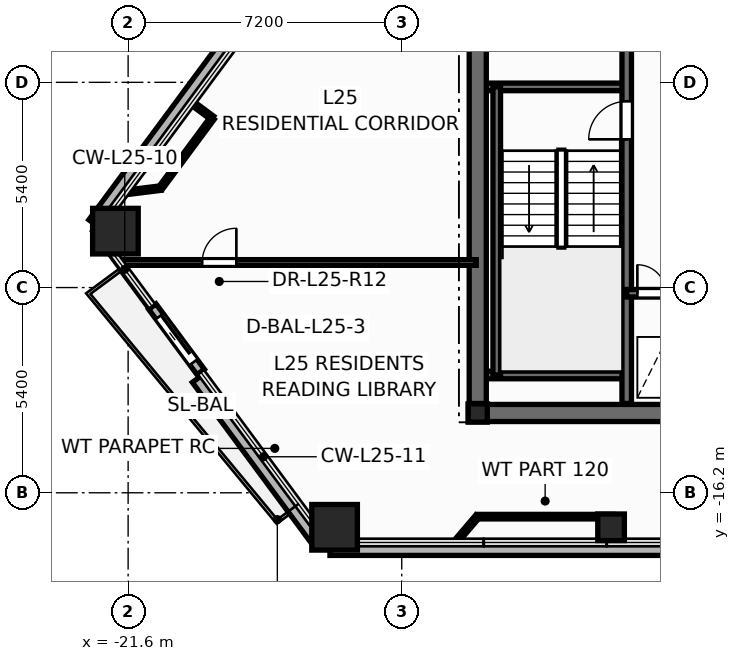
"""IFC4 building model, lengths in metres.
Left out: names, types, materials, properties, quantities, classifications, styles, units other than length and angle.
Written with IfcOpenShell. Run it as: python <this file> out.ifc"""

import sys

from ifc_helpers import new_model, si_unit, direction, frame, frame_2d, origin, origin_2d, place, context, subcontext, project, spatial, rectangle, hollow_rectangle, hollow_circle, i_section, extrude, element, fill, save


model = new_model("IFC4")
c1 = context("Model", 3, precision=1e-05, world=origin(), true_north=direction((0.0, 1.0)))
c2 = subcontext(c1, "Body", "Model", "MODEL_VIEW")
j1 = project(units=[si_unit("LENGTHUNIT", "METRE"), si_unit("PLANEANGLEUNIT", "RADIAN")], contexts=[c1])
p1 = place(None, origin())
s1 = spatial("IfcSite", under=j1, at=p1, CompositionType="ELEMENT")
p2 = place(p1, origin())
s2 = spatial("IfcBuilding", under=s1, at=p2, CompositionType="ELEMENT")
p3 = place(p2, frame((0.0, 0.0, 99.6)))
s3 = spatial("IfcBuildingStorey", under=s2, at=p3, CompositionType="ELEMENT", Elevation=99.6)
for number, where, z_axis, x_axis in (
    (1, (-21.934, -9.316, 0.0), (0.0, 0.0, 1.0), (1.0, 0.0, 0.0)),
    (2, (-16.167, -17.108, 0.0), (0.0, 0.0, 1.0), (1.0, 0.0, 0.0)),
):
    element("IfcColumn", number, at=place(p3, frame(where, z_axis=z_axis, x_axis=x_axis)), inside=s3, PredefinedType="COLUMN", context=c2, shape_type="SweptSolid", body=[
        extrude(hollow_rectangle(XDim=1.2, YDim=1.2, WallThickness=0.055, at=origin_2d()), origin(), (0.0, 0.0, 1.0), 3.6),
    ])
p4 = place(p3, frame((-8.892, -17.108, 0.0), z_axis=(0.0, 0.0, 1.0), x_axis=(1.0, 0.0, 0.0)))
e3 = element("IfcColumn", 3, at=p4, inside=s3, PredefinedType="COLUMN", context=c2, shape_type="SweptSolid", body=[
    extrude(hollow_circle(Radius=0.35, WallThickness=0.03, at=origin_2d()), origin(), (0.0, 0.0, 1.0), 3.6),
])
p5 = place(p3, frame((-12.4, -14.1, 0.0), z_axis=(0.0, 0.0, 1.0), x_axis=(1.0, 0.0, 0.0)))
e4 = element("IfcColumn", 4, at=p5, inside=s3, PredefinedType="COLUMN", context=c2, shape_type="SweptSolid", body=[
    extrude(i_section(OverallWidth=0.5, OverallDepth=0.482, WebThickness=0.04, FlangeThickness=0.045, at=origin_2d()), origin(), (0.0, 0.0, 1.0), 3.6),
])
p6 = place(p3, frame((-19.765, -13.188, -0.2), z_axis=(0.0, 0.0, 1.0), x_axis=(0.594913467102, -0.803789752772, 0.0)))
e5 = element("IfcWall", 5, at=p6, inside=s3, PredefinedType="PARAPET", context=c2, shape_type="SweptSolid", body=[
    extrude(rectangle(XDim=5.373, YDim=0.36, at=frame_2d((2.687, 0.0))), origin(), (0.0, 0.0, 1.0), 0.38),
])
p7 = place(p3, frame((-16.289, -17.668, -0.2), z_axis=(0.0, 0.0, 1.0), x_axis=(1.0, 0.0, 0.0)))
e6 = element("IfcWall", 6, at=p7, inside=s3, PredefinedType="PARAPET", context=c2, shape_type="SweptSolid", body=[
    extrude(rectangle(XDim=32.577, YDim=0.36, at=frame_2d((16.289, 0.0))), origin(), (0.0, 0.0, 1.0), 0.38),
])
p8 = place(p3, frame((-14.381, 1.831, -0.2), z_axis=(0.0, 0.0, 1.0), x_axis=(-0.594911761431, -0.803791015197, 0.0)))
e7 = element("IfcWall", 7, at=p8, inside=s3, PredefinedType="PARAPET", context=c2, shape_type="SweptSolid", body=[
    extrude(rectangle(XDim=13.628, YDim=0.36, at=frame_2d((6.814, 0.0))), origin(), (0.0, 0.0, 1.0), 0.38),
])
p9 = place(p3, frame((-20.963, -11.3, -0.015), z_axis=(0.0, 0.0, 1.0), x_axis=(0.59491376708, -0.803789530747, 0.0)))
e8 = element("IfcWall", 8, at=p9, inside=s3, PredefinedType="STANDARD", context=c2, shape_type="SweptSolid", body=[
    extrude(rectangle(XDim=2.14, YDim=0.24, at=frame_2d((1.07, 0.0))), origin(), (0.0, 0.0, 1.0), 2.729),
])
p10 = place(p9, frame((0.32, 0.0, 0.015)))
e9 = element("IfcOpeningElement", 9, at=p10, cuts=e8, PredefinedType="OPENING", context=c2, shape_type="SweptSolid", body=[
    extrude(rectangle(XDim=1.506, YDim=2.204, at=frame_2d((0.75, 1.102))), frame((0.0, 0.13, 0.0), z_axis=(0.0, -1.0, 0.0), x_axis=(1.0, 0.0, 0.0)), (0.0, 0.0, 1.0), 0.26),
])
p11 = place(p3, frame((-12.65, -14.1, 0.0), z_axis=(0.0, 0.0, 1.0), x_axis=(1.0, 0.0, 0.0)))
e10 = element("IfcWall", 10, at=p11, inside=s3, PredefinedType="SHEAR", context=c2, shape_type="SweptSolid", body=[
    extrude(rectangle(XDim=25.3, YDim=0.45, at=frame_2d((12.65, 0.0))), origin(), (0.0, 0.0, 1.0), 3.6),
])
for number, where, z_axis, x_axis in (
    (11, (-12.35, -5.52, 0.0), (0.0, 0.0, 1.0), (1.0, 0.0, 0.0)),
    (12, (-12.35, -13.1, 0.0), (0.0, 0.0, 1.0), (1.0, 0.0, 0.0)),
):
    element("IfcWall", number, at=place(p3, frame(where, z_axis=z_axis, x_axis=x_axis)), inside=s3, PredefinedType="SOLIDWALL", context=c2, shape_type="SweptSolid", body=[
        extrude(rectangle(XDim=3.87, YDim=0.2, at=frame_2d((1.935, 0.0))), origin(), (0.0, 0.0, 1.0), 3.6),
    ])
p12 = place(p3, frame((-11.9, -13.1, 0.0), z_axis=(0.0, 0.0, 1.0), x_axis=(0.0, 1.0, 0.0)))
e13 = element("IfcWall", 13, at=p12, inside=s3, PredefinedType="SOLIDWALL", context=c2, shape_type="SweptSolid", body=[
    extrude(rectangle(XDim=7.58, YDim=0.2, at=frame_2d((3.79, 0.0))), origin(), (0.0, 0.0, 1.0), 3.6),
])
p13 = place(p3, frame((-8.48, -13.85, 0.0), z_axis=(0.0, 0.0, 1.0), x_axis=(0.0, 1.0, 0.0)))
e14 = element("IfcWall", 14, at=p13, inside=s3, PredefinedType="SHEAR", context=c2, shape_type="SweptSolid", body=[
    extrude(rectangle(XDim=9.4, YDim=0.25, at=frame_2d((4.7, 0.0))), origin(), (0.0, 0.0, 1.0), 3.6),
])
p14 = place(p13, frame((6.95, 0.0, 0.0)))
e15 = element("IfcOpeningElement", 15, at=p14, cuts=e14, PredefinedType="OPENING", context=c2, shape_type="SweptSolid", body=[
    extrude(rectangle(XDim=1.006, YDim=2.104, at=frame_2d((0.5, 1.052))), frame((0.0, 0.135, 0.0), z_axis=(0.0, -1.0, 0.0), x_axis=(1.0, 0.0, 0.0)), (0.0, 0.0, 1.0), 0.27),
])
p15 = place(p3, frame((-8.48, -10.95, 0.0), z_axis=(0.0, 0.0, 1.0), x_axis=(1.0, 0.0, 0.0)))
e16 = element("IfcWall", 16, at=p15, inside=s3, PredefinedType="SOLIDWALL", context=c2, shape_type="SweptSolid", body=[
    extrude(rectangle(XDim=3.36, YDim=0.2, at=frame_2d((1.68, 0.0))), origin(), (0.0, 0.0, 1.0), 3.6),
])
p16 = place(p15, frame((0.28, 0.0, 0.0)))
e17 = element("IfcOpeningElement", 17, at=p16, cuts=e16, PredefinedType="OPENING", context=c2, shape_type="SweptSolid", body=[
    extrude(rectangle(XDim=0.756, YDim=2.054, at=frame_2d((0.375, 1.027))), frame((0.0, 0.11, 0.0), z_axis=(0.0, -1.0, 0.0), x_axis=(1.0, 0.0, 0.0)), (0.0, 0.0, 1.0), 0.22),
])
p17 = place(p15, frame((1.85, 0.0, 0.0)))
e18 = element("IfcOpeningElement", 18, at=p17, cuts=e16, PredefinedType="OPENING", context=c2, shape_type="SweptSolid", body=[
    extrude(rectangle(XDim=1.106, YDim=2.104, at=frame_2d((0.55, 1.052))), frame((0.0, 0.11, 0.0), z_axis=(0.0, -1.0, 0.0), x_axis=(1.0, 0.0, 0.0)), (0.0, 0.0, 1.0), 0.22),
])
p18 = place(p3, frame((-12.4, -13.85, 0.0), z_axis=(0.0, 0.0, 1.0), x_axis=(0.0, 1.0, 0.0)))
e19 = element("IfcWall", 19, at=p18, inside=s3, PredefinedType="SHEAR", context=c2, shape_type="SweptSolid", body=[
    extrude(rectangle(XDim=9.4, YDim=0.45, at=frame_2d((4.7, 0.0))), origin(), (0.0, 0.0, 1.0), 3.6),
])
p19 = place(p3, frame((-21.822, -10.14, 0.0), z_axis=(0.0, 0.0, 1.0), x_axis=(1.0, 0.0, 0.0)))
e20 = element("IfcWall", 20, at=p19, inside=s3, PredefinedType="PARTITIONING", context=c2, shape_type="SweptSolid", body=[
    extrude(rectangle(XDim=9.382, YDim=0.15, at=frame_2d((4.691, 0.0))), origin(), (0.0, 0.0, 1.0), 2.713),
])
p20 = place(p19, frame((2.17, 0.0, 0.0)))
e21 = element("IfcOpeningElement", 21, at=p20, cuts=e20, PredefinedType="OPENING", context=c2, shape_type="SweptSolid", body=[
    extrude(rectangle(XDim=0.906, YDim=2.104, at=frame_2d((0.45, 1.052))), frame((0.0, 0.085, 0.0), z_axis=(0.0, -1.0, 0.0), x_axis=(1.0, 0.0, 0.0)), (0.0, 0.0, 1.0), 0.17),
])
p21 = place(p3, frame((-12.411, -16.828, 0.0), z_axis=(0.0, 0.0, 1.0), x_axis=(1.0, 0.0, 0.0)))
e22 = element("IfcWall", 22, at=p21, inside=s3, PredefinedType="PARTITIONING", context=c2, shape_type="SweptSolid", body=[
    extrude(rectangle(XDim=3.569, YDim=0.12, at=frame_2d((1.784, 0.0))), origin(), (0.0, 0.0, 1.0), 2.713),
])
p22 = place(p3, frame((-19.383, -6.339, 0.0), z_axis=(0.0, 0.0, 1.0), x_axis=(-0.594914508596, -0.803788981924, 0.0)))
e23 = element("IfcWall", 23, at=p22, inside=s3, PredefinedType="PARTITIONING", context=c2, shape_type="SweptSolid", body=[
    extrude(rectangle(XDim=2.294, YDim=0.12, at=frame_2d((1.147, 0.0))), origin(), (0.0, 0.0, 1.0), 3.35),
])
p23 = place(p3, frame((-12.982, -17.498, 0.0), z_axis=(0.0, 0.0, 1.0), x_axis=(0.649031566587, 0.760761477451, 0.0)))
e24 = element("IfcWall", 24, at=p23, inside=s3, PredefinedType="PARTITIONING", context=c2, shape_type="SweptSolid", body=[
    extrude(rectangle(XDim=0.881, YDim=0.12, at=frame_2d((0.44, 0.0))), origin(), (0.0, 0.0, 1.0), 2.713),
])
p24 = place(p3, frame((-20.748, -8.183, 0.0), z_axis=(0.0, 0.0, 1.0), x_axis=(-0.992286724014, -0.123963935667, 0.0)))
e25 = element("IfcWall", 25, at=p24, inside=s3, PredefinedType="PARTITIONING", context=c2, shape_type="SweptSolid", body=[
    extrude(rectangle(XDim=0.849, YDim=0.12, at=frame_2d((0.424, 0.0))), origin(), (0.0, 0.0, 1.0), 2.713),
])
p25 = place(p3, frame((-19.921, -5.94, 0.0), z_axis=(0.0, 0.0, 1.0), x_axis=(0.803744328022, -0.594974835748, 0.0)))
e26 = element("IfcWall", 26, at=p25, inside=s3, PredefinedType="PARTITIONING", context=c2, shape_type="SweptSolid", body=[
    extrude(rectangle(XDim=0.67, YDim=0.12, at=frame_2d((0.335, 0.0))), origin(), (0.0, 0.0, 1.0), 2.713),
])
p26 = place(p3, frame((-8.842, -16.828, 0.0), z_axis=(0.0, 0.0, 1.0), x_axis=(0.0, -1.0, 0.0)))
e27 = element("IfcWall", 27, at=p26, inside=s3, PredefinedType="PARTITIONING", context=c2, shape_type="SweptSolid", body=[
    extrude(rectangle(XDim=0.67, YDim=0.12, at=frame_2d((0.335, 0.0))), origin(), (0.0, 0.0, 1.0), 2.713),
])
p27 = place(p10, origin())
e28 = element("IfcDoor", 28, at=p27, inside=s3, OperationType="SLIDING_TO_RIGHT", PredefinedType="DOOR", context=c2, shape_type="SweptSolid", body=[
    extrude(rectangle(XDim=1.5, YDim=2.2, at=frame_2d((0.75, 1.1))), frame((0.0, 0.025, 0.0), z_axis=(0.0, -1.0, 0.0), x_axis=(1.0, 0.0, 0.0)), (0.0, 0.0, 1.0), 0.05),
])
fill(e9, e28)
p28 = place(p14, origin())
e29 = element("IfcDoor", 29, at=p28, inside=s3, OperationType="SINGLE_SWING_LEFT", PredefinedType="DOOR", context=c2, shape_type="SweptSolid", body=[
    extrude(rectangle(XDim=1.0, YDim=2.1, at=frame_2d((0.5, 1.05))), frame((0.0, 0.025, 0.0), z_axis=(0.0, -1.0, 0.0), x_axis=(1.0, 0.0, 0.0)), (0.0, 0.0, 1.0), 0.05),
])
fill(e15, e29)
p29 = place(p16, origin())
e30 = element("IfcDoor", 30, at=p29, inside=s3, OperationType="SINGLE_SWING_LEFT", PredefinedType="DOOR", context=c2, shape_type="SweptSolid", body=[
    extrude(rectangle(XDim=0.75, YDim=2.05, at=frame_2d((0.375, 1.025))), frame((0.0, 0.025, 0.0), z_axis=(0.0, -1.0, 0.0), x_axis=(1.0, 0.0, 0.0)), (0.0, 0.0, 1.0), 0.05),
])
fill(e17, e30)
p30 = place(p20, origin())
e31 = element("IfcDoor", 31, at=p30, inside=s3, OperationType="SINGLE_SWING_RIGHT", PredefinedType="DOOR", context=c2, shape_type="SweptSolid", body=[
    extrude(rectangle(XDim=0.9, YDim=2.1, at=frame_2d((0.45, 1.05))), frame((0.0, 0.025, 0.0), z_axis=(0.0, -1.0, 0.0), x_axis=(1.0, 0.0, 0.0)), (0.0, 0.0, 1.0), 0.05),
])
fill(e21, e31)
save(model, sys.argv[1])
